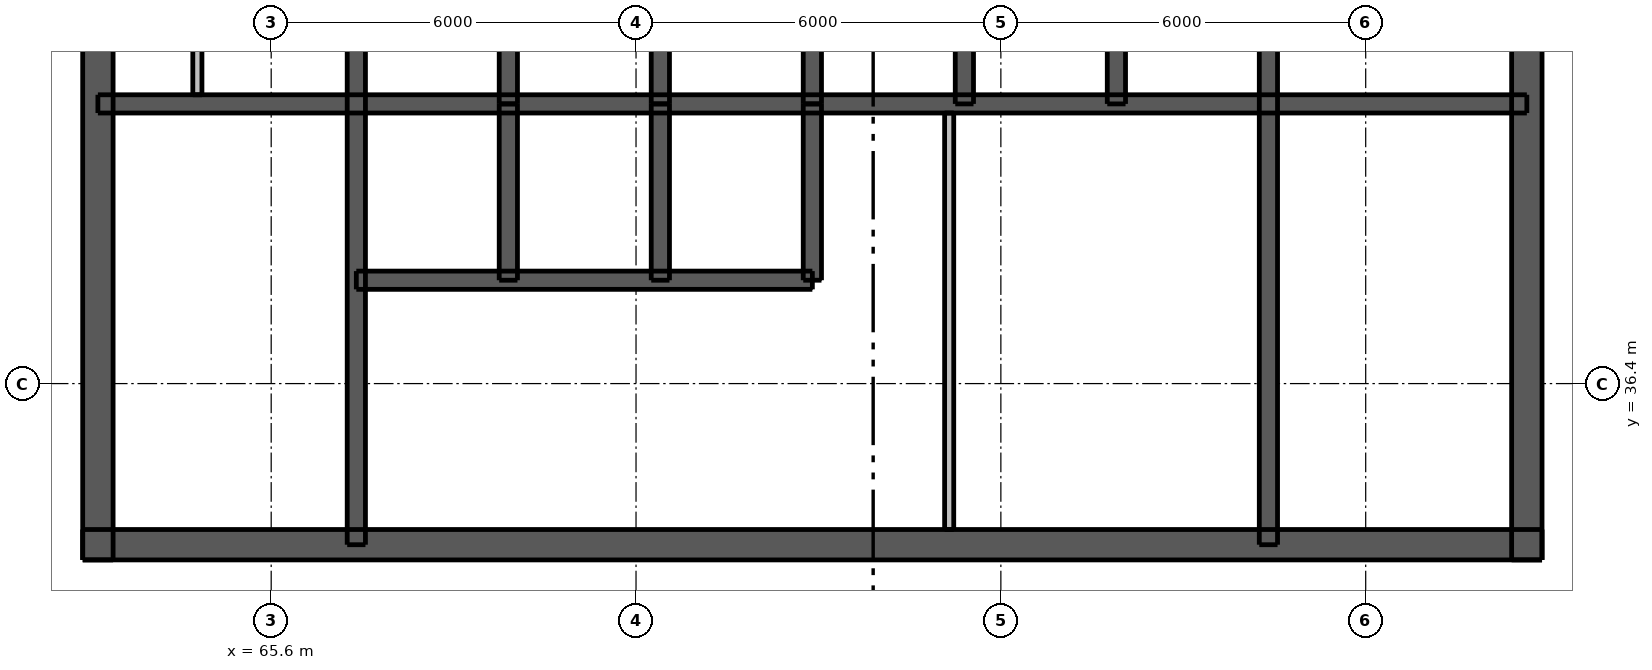
"""IFC4 building model, lengths in metres.
Left out: names, types, materials, properties, quantities, classifications, styles, units other than length and angle.
Written with IfcOpenShell. Run it as: python <this file> out.ifc"""

import sys

from ifc_helpers import new_model, si_unit, direction, frame, frame_2d, origin, place, context, subcontext, project, spatial, rectangle, extrude, element, fill, save


model = new_model("IFC4")
c1 = context("Model", 3, precision=1e-05, world=origin(), true_north=direction((0.0, 1.0)))
c2 = subcontext(c1, "Body", "Model", "MODEL_VIEW")
j1 = project(units=[si_unit("LENGTHUNIT", "METRE"), si_unit("PLANEANGLEUNIT", "RADIAN")], contexts=[c1])
p1 = place(None, origin())
s1 = spatial("IfcSite", under=j1, at=p1, CompositionType="ELEMENT")
p2 = place(p1, origin())
s2 = spatial("IfcBuilding", under=s1, at=p2, CompositionType="ELEMENT")
p3 = place(p2, frame((0.0, 0.0, 275.2)))
s3 = spatial("IfcBuildingStorey", under=s2, at=p3, CompositionType="ELEMENT", Elevation=275.2)
p4 = place(p3, frame((62.5, 33.75, 0.0), z_axis=(0.0, 0.0, 1.0), x_axis=(1.0, 0.0, 0.0)))
e1 = element("IfcWall", 1, at=p4, inside=s3, PredefinedType="SHEAR", context=c2, shape_type="SweptSolid", body=[
    extrude(rectangle(XDim=24.0, YDim=0.5, at=frame_2d((12.0, 0.0))), origin(), (0.0, 0.0, 1.0), 3.05),
])
p5 = place(p4, frame((1.875, 0.0, 0.0)))
e2 = element("IfcOpeningElement", 2, at=p5, cuts=e1, PredefinedType="OPENING", context=c2, shape_type="SweptSolid", body=[
    extrude(rectangle(XDim=1.1, YDim=2.1, at=frame_2d((0.55, 1.05))), frame((0.0, 0.26, 0.0), z_axis=(0.0, -1.0, 0.0), x_axis=(1.0, 0.0, 0.0)), (0.0, 0.0, 1.0), 0.52),
])
p6 = place(p4, frame((21.025, 0.0, 0.0)))
e3 = element("IfcOpeningElement", 3, at=p6, cuts=e1, PredefinedType="OPENING", context=c2, shape_type="SweptSolid", body=[
    extrude(rectangle(XDim=1.1, YDim=2.1, at=frame_2d((0.55, 1.05))), frame((0.0, 0.26, 0.0), z_axis=(0.0, -1.0, 0.0), x_axis=(1.0, 0.0, 0.0)), (0.0, 0.0, 1.0), 0.52),
])
p7 = place(p4, frame((8.0, 0.0, 0.0)))
e4 = element("IfcOpeningElement", 4, at=p7, cuts=e1, PredefinedType="OPENING", context=c2, shape_type="SweptSolid", body=[
    extrude(rectangle(XDim=1.1, YDim=2.1, at=frame_2d((0.55, 1.05))), frame((0.0, 0.26, 0.0), z_axis=(0.0, -1.0, 0.0), x_axis=(1.0, 0.0, 0.0)), (0.0, 0.0, 1.0), 0.52),
])
p8 = place(p4, frame((16.387, 0.0, 0.0)))
e5 = element("IfcOpeningElement", 5, at=p8, cuts=e1, PredefinedType="OPENING", context=c2, shape_type="SweptSolid", body=[
    extrude(rectangle(XDim=0.9, YDim=2.1, at=frame_2d((0.45, 1.05))), frame((0.0, 0.26, 0.0), z_axis=(0.0, -1.0, 0.0), x_axis=(1.0, 0.0, 0.0)), (0.0, 0.0, 1.0), 0.52),
])
p9 = place(p3, frame((62.75, 33.5, 0.0), z_axis=(0.0, 0.0, 1.0), x_axis=(0.0, 1.0, 0.0)))
e6 = element("IfcWall", 6, at=p9, inside=s3, PredefinedType="SHEAR", context=c2, shape_type="SweptSolid", body=[
    extrude(rectangle(XDim=24.0, YDim=0.5, at=frame_2d((12.0, 0.0))), origin(), (0.0, 0.0, 1.0), 3.05),
])
p10 = place(p9, frame((11.2, 0.0, 0.0)))
e7 = element("IfcOpeningElement", 7, at=p10, cuts=e6, PredefinedType="OPENING", context=c2, shape_type="SweptSolid", body=[
    extrude(rectangle(XDim=1.6, YDim=2.1, at=frame_2d((0.8, 1.05))), frame((0.0, 0.26, 0.0), z_axis=(0.0, -1.0, 0.0), x_axis=(1.0, 0.0, 0.0)), (0.0, 0.0, 1.0), 0.52),
])
p11 = place(p3, frame((86.25, 33.5, 0.0), z_axis=(0.0, 0.0, 1.0), x_axis=(0.0, 1.0, 0.0)))
e8 = element("IfcWall", 8, at=p11, inside=s3, PredefinedType="SHEAR", context=c2, shape_type="SweptSolid", body=[
    extrude(rectangle(XDim=24.0, YDim=0.5, at=frame_2d((12.0, 0.0))), origin(), (0.0, 0.0, 1.0), 3.05),
])
p12 = place(p11, frame((11.2, 0.0, 0.0)))
e9 = element("IfcOpeningElement", 9, at=p12, cuts=e8, PredefinedType="OPENING", context=c2, shape_type="SweptSolid", body=[
    extrude(rectangle(XDim=1.6, YDim=2.1, at=frame_2d((0.8, 1.05))), frame((0.0, 0.26, 0.0), z_axis=(0.0, -1.0, 0.0), x_axis=(1.0, 0.0, 0.0)), (0.0, 0.0, 1.0), 0.52),
])
p13 = place(p3, frame((62.75, 41.0, 0.0), z_axis=(0.0, 0.0, 1.0), x_axis=(1.0, 0.0, 0.0)))
e10 = element("IfcWall", 10, at=p13, inside=s3, PredefinedType="SHEAR", context=c2, shape_type="SweptSolid", body=[
    extrude(rectangle(XDim=23.5, YDim=0.3, at=frame_2d((11.75, 0.0))), origin(), (0.0, 0.0, 1.0), 3.05),
])
p14 = place(p3, frame((67.0, 33.75, 0.0), z_axis=(0.0, 0.0, 1.0), x_axis=(0.0, 1.0, 0.0)))
e11 = element("IfcWall", 11, at=p14, inside=s3, PredefinedType="SHEAR", context=c2, shape_type="SweptSolid", body=[
    extrude(rectangle(XDim=10.15, YDim=0.3, at=frame_2d((5.075, 0.0))), origin(), (0.0, 0.0, 1.0), 3.05),
])
p15 = place(p14, frame((0.45, 0.0, 0.0)))
e12 = element("IfcOpeningElement", 12, at=p15, cuts=e11, PredefinedType="OPENING", context=c2, shape_type="SweptSolid", body=[
    extrude(rectangle(XDim=1.1, YDim=2.1, at=frame_2d((0.55, 1.05))), frame((0.0, 0.16, 0.0), z_axis=(0.0, -1.0, 0.0), x_axis=(1.0, 0.0, 0.0)), (0.0, 0.0, 1.0), 0.32),
])
p16 = place(p3, frame((82.0, 33.75, 0.0), z_axis=(0.0, 0.0, 1.0), x_axis=(0.0, 1.0, 0.0)))
e13 = element("IfcWall", 13, at=p16, inside=s3, PredefinedType="SHEAR", context=c2, shape_type="SweptSolid", body=[
    extrude(rectangle(XDim=10.15, YDim=0.3, at=frame_2d((5.075, 0.0))), origin(), (0.0, 0.0, 1.0), 3.05),
])
for number, where, z_axis, x_axis in (
    (14, (69.5, 41.0, 0.0), (0.0, 0.0, 1.0), (0.0, 1.0, 0.0)),
    (15, (72.0, 41.0, 0.0), (0.0, 0.0, 1.0), (0.0, 1.0, 0.0)),
    (16, (74.5, 41.0, 0.0), (0.0, 0.0, 1.0), (0.0, 1.0, 0.0)),
    (17, (77.0, 41.0, 0.0), (0.0, 0.0, 1.0), (0.0, 1.0, 0.0)),
    (18, (79.5, 41.0, 0.0), (0.0, 0.0, 1.0), (0.0, 1.0, 0.0)),
):
    element("IfcWall", number, at=place(p3, frame(where, z_axis=z_axis, x_axis=x_axis)), inside=s3, PredefinedType="SHEAR", context=c2, shape_type="SweptSolid", body=[
        extrude(rectangle(XDim=2.9, YDim=0.3, at=frame_2d((1.45, 0.0))), origin(), (0.0, 0.0, 1.0), 3.05),
    ])
p17 = place(p3, frame((67.0, 38.1, 0.0), z_axis=(0.0, 0.0, 1.0), x_axis=(1.0, 0.0, 0.0)))
e19 = element("IfcWall", 19, at=p17, inside=s3, PredefinedType="SHEAR", context=c2, shape_type="SweptSolid", body=[
    extrude(rectangle(XDim=7.5, YDim=0.3, at=frame_2d((3.75, 0.0))), origin(), (0.0, 0.0, 1.0), 3.05),
])
p18 = place(p17, frame((0.7, 0.0, 0.0)))
e20 = element("IfcOpeningElement", 20, at=p18, cuts=e19, PredefinedType="OPENING", context=c2, shape_type="SweptSolid", body=[
    extrude(rectangle(XDim=1.1, YDim=2.1, at=frame_2d((0.55, 1.05))), frame((0.0, 0.16, 0.0), z_axis=(0.0, -1.0, 0.0), x_axis=(1.0, 0.0, 0.0)), (0.0, 0.0, 1.0), 0.32),
])
p19 = place(p17, frame((3.2, 0.0, 0.0)))
e21 = element("IfcOpeningElement", 21, at=p19, cuts=e19, PredefinedType="OPENING", context=c2, shape_type="SweptSolid", body=[
    extrude(rectangle(XDim=1.1, YDim=2.1, at=frame_2d((0.55, 1.05))), frame((0.0, 0.16, 0.0), z_axis=(0.0, -1.0, 0.0), x_axis=(1.0, 0.0, 0.0)), (0.0, 0.0, 1.0), 0.32),
])
p20 = place(p17, frame((5.65, 0.0, 0.0)))
e22 = element("IfcOpeningElement", 22, at=p20, cuts=e19, PredefinedType="OPENING", context=c2, shape_type="SweptSolid", body=[
    extrude(rectangle(XDim=1.2, YDim=2.1, at=frame_2d((0.6, 1.05))), frame((0.0, 0.16, 0.0), z_axis=(0.0, -1.0, 0.0), x_axis=(1.0, 0.0, 0.0)), (0.0, 0.0, 1.0), 0.32),
])
for number, where, z_axis, x_axis in (
    (23, (69.5, 38.1, 0.0), (0.0, 0.0, 1.0), (0.0, 1.0, 0.0)),
    (24, (72.0, 38.1, 0.0), (0.0, 0.0, 1.0), (0.0, 1.0, 0.0)),
    (25, (74.5, 38.1, 0.0), (0.0, 0.0, 1.0), (0.0, 1.0, 0.0)),
):
    element("IfcWall", number, at=place(p3, frame(where, z_axis=z_axis, x_axis=x_axis)), inside=s3, PredefinedType="SHEAR", context=c2, shape_type="SweptSolid", body=[
        extrude(rectangle(XDim=2.9, YDim=0.3, at=frame_2d((1.45, 0.0))), origin(), (0.0, 0.0, 1.0), 3.05),
    ])
p21 = place(p3, frame((76.75, 34.0, 0.0), z_axis=(0.0, 0.0, 1.0), x_axis=(0.0, 1.0, 0.0)))
e26 = element("IfcWall", 26, at=p21, inside=s3, PredefinedType="PLUMBINGWALL", context=c2, shape_type="SweptSolid", body=[
    extrude(rectangle(XDim=6.85, YDim=0.15, at=frame_2d((3.425, 0.0))), origin(), (0.0, 0.0, 1.0), 3.05),
])
p22 = place(p3, frame((64.386, 41.15, 0.0), z_axis=(0.0, 0.0, 1.0), x_axis=(0.0, 1.0, 0.0)))
e27 = element("IfcWall", 27, at=p22, inside=s3, PredefinedType="PLUMBINGWALL", context=c2, shape_type="SweptSolid", body=[
    extrude(rectangle(XDim=2.6, YDim=0.15, at=frame_2d((1.3, 0.0))), origin(), (0.0, 0.0, 1.0), 3.05),
])
p23 = place(p5, origin())
e28 = element("IfcDoor", 28, at=p23, inside=s3, OperationType="SINGLE_SWING_LEFT", PredefinedType="DOOR", context=c2, shape_type="SweptSolid", body=[
    extrude(rectangle(XDim=1.1, YDim=2.1, at=frame_2d((0.55, 1.05))), frame((0.0, 0.237, 0.0), z_axis=(0.0, -1.0, 0.0), x_axis=(1.0, 0.0, 0.0)), (0.0, 0.0, 1.0), 0.05),
])
fill(e2, e28)
p24 = place(p6, origin())
e29 = element("IfcDoor", 29, at=p24, inside=s3, OperationType="SINGLE_SWING_RIGHT", PredefinedType="DOOR", context=c2, shape_type="SweptSolid", body=[
    extrude(rectangle(XDim=1.1, YDim=2.1, at=frame_2d((0.55, 1.05))), frame((0.0, 0.237, 0.0), z_axis=(0.0, -1.0, 0.0), x_axis=(1.0, 0.0, 0.0)), (0.0, 0.0, 1.0), 0.05),
])
fill(e3, e29)
p25 = place(p7, origin())
e30 = element("IfcDoor", 30, at=p25, inside=s3, OperationType="SINGLE_SWING_LEFT", PredefinedType="DOOR", context=c2, shape_type="SweptSolid", body=[
    extrude(rectangle(XDim=1.1, YDim=2.1, at=frame_2d((0.55, 1.05))), frame((0.0, 0.237, 0.0), z_axis=(0.0, -1.0, 0.0), x_axis=(1.0, 0.0, 0.0)), (0.0, 0.0, 1.0), 0.05),
])
fill(e4, e30)
p26 = place(p15, origin())
e31 = element("IfcDoor", 31, at=p26, inside=s3, OperationType="SINGLE_SWING_RIGHT", PredefinedType="DOOR", context=c2, shape_type="SweptSolid", body=[
    extrude(rectangle(XDim=1.1, YDim=2.1, at=frame_2d((0.55, 1.05))), frame((0.0, -0.087, 0.0), z_axis=(0.0, -1.0, 0.0), x_axis=(1.0, 0.0, 0.0)), (0.0, 0.0, 1.0), 0.05),
])
fill(e12, e31)
p27 = place(p8, origin())
e32 = element("IfcDoor", 32, at=p27, inside=s3, OperationType="SINGLE_SWING_LEFT", PredefinedType="DOOR", context=c2, shape_type="SweptSolid", body=[
    extrude(rectangle(XDim=0.9, YDim=2.1, at=frame_2d((0.45, 1.05))), frame((0.0, 0.237, 0.0), z_axis=(0.0, -1.0, 0.0), x_axis=(1.0, 0.0, 0.0)), (0.0, 0.0, 1.0), 0.05),
])
fill(e5, e32)
p28 = place(p18, origin())
e33 = element("IfcDoor", 33, at=p28, inside=s3, OperationType="DOUBLE_DOOR_SLIDING", PredefinedType="DOOR", context=c2, shape_type="SweptSolid", body=[
    extrude(rectangle(XDim=1.1, YDim=2.1, at=frame_2d((0.55, 1.05))), frame((0.0, 0.025, 0.0), z_axis=(0.0, -1.0, 0.0), x_axis=(1.0, 0.0, 0.0)), (0.0, 0.0, 1.0), 0.05),
])
fill(e20, e33)
p29 = place(p19, origin())
e34 = element("IfcDoor", 34, at=p29, inside=s3, OperationType="DOUBLE_DOOR_SLIDING", PredefinedType="DOOR", context=c2, shape_type="SweptSolid", body=[
    extrude(rectangle(XDim=1.1, YDim=2.1, at=frame_2d((0.55, 1.05))), frame((0.0, 0.025, 0.0), z_axis=(0.0, -1.0, 0.0), x_axis=(1.0, 0.0, 0.0)), (0.0, 0.0, 1.0), 0.05),
])
fill(e21, e34)
p30 = place(p20, origin())
e35 = element("IfcDoor", 35, at=p30, inside=s3, OperationType="DOUBLE_DOOR_SLIDING", PredefinedType="DOOR", context=c2, shape_type="SweptSolid", body=[
    extrude(rectangle(XDim=1.2, YDim=2.1, at=frame_2d((0.6, 1.05))), frame((0.0, 0.025, 0.0), z_axis=(0.0, -1.0, 0.0), x_axis=(1.0, 0.0, 0.0)), (0.0, 0.0, 1.0), 0.05),
])
fill(e22, e35)
save(model, sys.argv[1])
